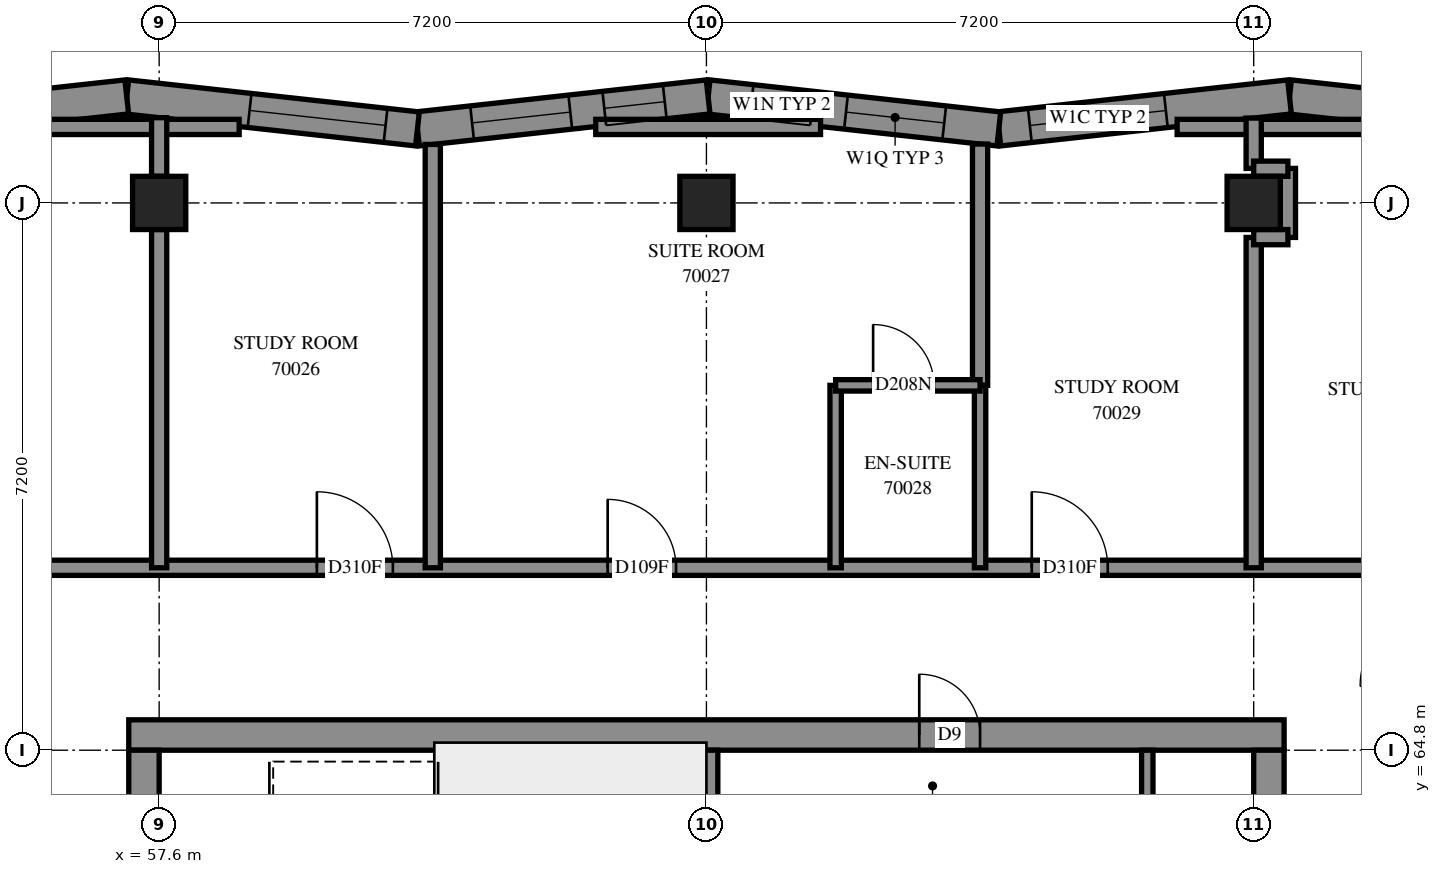
"""IFC4 building model, lengths in metres.
Left out: names, types, materials, properties, quantities, classifications, styles, units other than length and angle.
Written with IfcOpenShell. Run it as: python <this file> out.ifc"""

import sys

from ifc_helpers import new_model, si_unit, direction, frame, frame_2d, origin, origin_2d, place, context, subcontext, project, spatial, polyline, rectangle, outline, extrude, element, fill, save


model = new_model("IFC4")
c1 = context("Model", 3, precision=1e-05, world=origin(), true_north=direction((0.0, 1.0)))
c2 = subcontext(c1, "Body", "Model", "MODEL_VIEW")
j1 = project(units=[si_unit("LENGTHUNIT", "METRE"), si_unit("PLANEANGLEUNIT", "RADIAN")], contexts=[c1])
p1 = place(None, origin())
s1 = spatial("IfcSite", under=j1, at=p1, CompositionType="ELEMENT")
p2 = place(p1, origin())
s2 = spatial("IfcBuilding", under=s1, at=p2, CompositionType="ELEMENT")
p3 = place(p2, frame((0.0, 0.0, 257.4)))
s3 = spatial("IfcBuildingStorey", under=s2, at=p3, CompositionType="ELEMENT", Elevation=257.4)
for number, where, z_axis, x_axis in (
    (1, (57.6, 72.0, 0.0), (0.0, 0.0, 1.0), (1.0, 0.0, 0.0)),
    (2, (64.8, 72.0, 0.0), (0.0, 0.0, 1.0), (1.0, 0.0, 0.0)),
    (3, (72.0, 72.0, 0.0), (0.0, 0.0, 1.0), (1.0, 0.0, 0.0)),
):
    element("IfcColumn", number, at=place(p3, frame(where, z_axis=z_axis, x_axis=x_axis)), inside=s3, PredefinedType="COLUMN", context=c2, shape_type="SweptSolid", body=[
        extrude(rectangle(XDim=0.7, YDim=0.7, at=origin_2d()), origin(), (0.0, 0.0, 1.0), 3.1),
    ])
p4 = place(p3, frame((57.2, 65.0, -0.3), z_axis=(0.0, 0.0, 1.0), x_axis=(1.0, 0.0, 0.0)))
e4 = element("IfcWall", 4, at=p4, inside=s3, PredefinedType="SHEAR", context=c2, shape_type="SweptSolid", body=[
    extrude(rectangle(XDim=15.2, YDim=0.4, at=frame_2d((7.6, 0.0))), origin(), (0.0, 0.0, 1.0), 2.7),
])
p5 = place(p4, frame((10.4, 0.0, 0.3)))
e5 = element("IfcOpeningElement", 5, at=p5, cuts=e4, PredefinedType="OPENING", context=c2, shape_type="SweptSolid", body=[
    extrude(rectangle(XDim=0.8, YDim=2.1, at=frame_2d((0.4, 1.05))), frame((0.0, 0.21, 0.0), z_axis=(0.0, -1.0, 0.0), x_axis=(1.0, 0.0, 0.0)), (0.0, 0.0, 1.0), 0.42),
])
p6 = place(p3, frame((57.4, 50.4, -0.3), z_axis=(0.0, 0.0, 1.0), x_axis=(0.0, 1.0, 0.0)))
e6 = element("IfcWall", 6, at=p6, inside=s3, PredefinedType="SHEAR", context=c2, shape_type="SweptSolid", body=[
    extrude(rectangle(XDim=14.4, YDim=0.4, at=frame_2d((7.2, 0.0))), origin(), (0.0, 0.0, 1.0), 2.7),
])
p7 = place(p6, frame((4.55, 0.0, 0.3)))
e7 = element("IfcOpeningElement", 7, at=p7, cuts=e6, PredefinedType="OPENING", context=c2, shape_type="SweptSolid", body=[
    extrude(rectangle(XDim=1.1, YDim=2.1, at=frame_2d((0.55, 1.05))), frame((0.0, 0.21, 0.0), z_axis=(0.0, -1.0, 0.0), x_axis=(1.0, 0.0, 0.0)), (0.0, 0.0, 1.0), 0.42),
])
p8 = place(p6, frame((11.35, 0.0, 0.3)))
e8 = element("IfcOpeningElement", 8, at=p8, cuts=e6, PredefinedType="OPENING", context=c2, shape_type="SweptSolid", body=[
    extrude(rectangle(XDim=1.1, YDim=2.1, at=frame_2d((0.55, 1.05))), frame((0.0, 0.21, 0.0), z_axis=(0.0, -1.0, 0.0), x_axis=(1.0, 0.0, 0.0)), (0.0, 0.0, 1.0), 0.42),
])
p9 = place(p3, frame((72.2, 50.4, -0.3), z_axis=(0.0, 0.0, 1.0), x_axis=(0.0, 1.0, 0.0)))
e9 = element("IfcWall", 9, at=p9, inside=s3, PredefinedType="SHEAR", context=c2, shape_type="SweptSolid", body=[
    extrude(rectangle(XDim=14.4, YDim=0.4, at=frame_2d((7.2, 0.0))), origin(), (0.0, 0.0, 1.0), 2.7),
])
p10 = place(p9, frame((4.55, 0.0, 0.3)))
e10 = element("IfcOpeningElement", 10, at=p10, cuts=e9, PredefinedType="OPENING", context=c2, shape_type="SweptSolid", body=[
    extrude(rectangle(XDim=1.1, YDim=2.1, at=frame_2d((0.55, 1.05))), frame((0.0, 0.21, 0.0), z_axis=(0.0, -1.0, 0.0), x_axis=(1.0, 0.0, 0.0)), (0.0, 0.0, 1.0), 0.42),
])
p11 = place(p9, frame((11.35, 0.0, 0.3)))
e11 = element("IfcOpeningElement", 11, at=p11, cuts=e9, PredefinedType="OPENING", context=c2, shape_type="SweptSolid", body=[
    extrude(rectangle(XDim=1.1, YDim=2.1, at=frame_2d((0.55, 1.05))), frame((0.0, 0.21, 0.0), z_axis=(0.0, -1.0, 0.0), x_axis=(1.0, 0.0, 0.0)), (0.0, 0.0, 1.0), 0.42),
])
p12 = place(p3, frame((64.8, 60.6, 0.0), z_axis=(0.0, 0.0, 1.0), x_axis=(0.0, 1.0, 0.0)))
e12 = element("IfcWall", 12, at=p12, inside=s3, PredefinedType="SOLIDWALL", context=c2, shape_type="SweptSolid", body=[
    extrude(rectangle(XDim=4.2, YDim=0.3, at=frame_2d((2.1, 0.0))), origin(), (0.0, 0.0, 1.0), 3.1),
])
p13 = place(p3, frame((76.313, 72.972, 0.0), z_axis=(0.0, 0.0, 1.0), x_axis=(-0.9939952411, 0.1094233099, 0.0)))
e13 = element("IfcWall", 13, at=p13, inside=s3, PredefinedType="SOLIDWALL", context=c2, shape_type="SweptSolid", body=[
    extrude(outline(polyline([(0.042, -0.225), (3.89, -0.225), (3.84, 0.225), (-0.042, 0.225), (0.042, -0.225)])), origin(), (0.0, 0.0, 1.0), 3.1),
])
p14 = place(p13, frame((1.029, 0.0, 0.45)))
e14 = element("IfcOpeningElement", 14, at=p14, cuts=e13, PredefinedType="OPENING", context=c2, shape_type="SweptSolid", body=[
    extrude(rectangle(XDim=1.2, YDim=2.55, at=frame_2d((0.6, 1.275))), frame((0.0, 0.235, 0.0), z_axis=(0.0, -1.0, 0.0), x_axis=(1.0, 0.0, 0.0)), (0.0, 0.0, 1.0), 0.47),
])
p15 = place(p3, frame((72.471, 73.395, 0.0), z_axis=(0.0, 0.0, 1.0), x_axis=(-0.9939954262, -0.1094216281, 0.0)))
e15 = element("IfcWall", 15, at=p15, inside=s3, PredefinedType="SOLIDWALL", context=c2, shape_type="SweptSolid", body=[
    extrude(outline(polyline([(-0.025, -0.225), (3.823, -0.225), (3.872, 0.225), (0.025, 0.225), (-0.025, -0.225)])), origin(), (0.0, 0.0, 1.0), 3.1),
])
p16 = place(p15, frame((1.637, 0.0, 0.7)))
e16 = element("IfcOpeningElement", 16, at=p16, cuts=e15, PredefinedType="OPENING", context=c2, shape_type="SweptSolid", body=[
    extrude(rectangle(XDim=1.8, YDim=2.3, at=frame_2d((0.9, 1.15))), frame((0.0, 0.235, 0.0), z_axis=(0.0, -1.0, 0.0), x_axis=(1.0, 0.0, 0.0)), (0.0, 0.0, 1.0), 0.47),
])
p17 = place(p3, frame((68.647, 72.974, 0.0), z_axis=(0.0, 0.0, 1.0), x_axis=(-0.993995115, 0.109424455, 0.0)))
e17 = element("IfcWall", 17, at=p17, inside=s3, PredefinedType="SOLIDWALL", context=c2, shape_type="SweptSolid", body=[
    extrude(outline(polyline([(0.025, -0.225), (3.872, -0.225), (3.823, 0.225), (-0.025, 0.225), (0.025, -0.225)])), origin(), (0.0, 0.0, 1.0), 3.1),
])
p18 = place(p17, frame((0.723, 0.0, 0.45)))
e18 = element("IfcOpeningElement", 18, at=p18, cuts=e17, PredefinedType="OPENING", context=c2, shape_type="SweptSolid", body=[
    extrude(rectangle(XDim=1.3, YDim=2.5, at=frame_2d((0.65, 1.25))), frame((0.0, 0.235, 0.0), z_axis=(0.0, -1.0, 0.0), x_axis=(1.0, 0.0, 0.0)), (0.0, 0.0, 1.0), 0.47),
])
p19 = place(p17, frame((2.473, 0.0, 0.45)))
e19 = element("IfcOpeningElement", 19, at=p19, cuts=e17, PredefinedType="OPENING", context=c2, shape_type="SweptSolid", body=[
    extrude(rectangle(XDim=0.8, YDim=2.5, at=frame_2d((0.4, 1.25))), frame((0.0, 0.235, 0.0), z_axis=(0.0, -1.0, 0.0), x_axis=(1.0, 0.0, 0.0)), (0.0, 0.0, 1.0), 0.47),
])
p20 = place(p3, frame((64.823, 73.395, 0.0), z_axis=(0.0, 0.0, 1.0), x_axis=(-0.9939954262, -0.1094216281, 0.0)))
e20 = element("IfcWall", 20, at=p20, inside=s3, PredefinedType="SOLIDWALL", context=c2, shape_type="SweptSolid", body=[
    extrude(outline(polyline([(-0.025, -0.225), (3.823, -0.225), (3.872, 0.225), (0.025, 0.225), (-0.025, -0.225)])), origin(), (0.0, 0.0, 1.0), 3.1),
])
p21 = place(p20, frame((0.575, 0.0, 0.45)))
e21 = element("IfcOpeningElement", 21, at=p21, cuts=e20, PredefinedType="OPENING", context=c2, shape_type="SweptSolid", body=[
    extrude(rectangle(XDim=0.8, YDim=2.5, at=frame_2d((0.4, 1.25))), frame((0.0, 0.235, 0.0), z_axis=(0.0, -1.0, 0.0), x_axis=(1.0, 0.0, 0.0)), (0.0, 0.0, 1.0), 0.47),
])
p22 = place(p20, frame((1.825, 0.0, 0.45)))
e22 = element("IfcOpeningElement", 22, at=p22, cuts=e20, PredefinedType="OPENING", context=c2, shape_type="SweptSolid", body=[
    extrude(rectangle(XDim=1.3, YDim=2.5, at=frame_2d((0.65, 1.25))), frame((0.0, 0.235, 0.0), z_axis=(0.0, -1.0, 0.0), x_axis=(1.0, 0.0, 0.0)), (0.0, 0.0, 1.0), 0.47),
])
p23 = place(p3, frame((60.998, 72.974, 0.0), z_axis=(0.0, 0.0, 1.0), x_axis=(-0.993995115, 0.109424455, 0.0)))
e23 = element("IfcWall", 23, at=p23, inside=s3, PredefinedType="SOLIDWALL", context=c2, shape_type="SweptSolid", body=[
    extrude(outline(polyline([(0.025, -0.225), (3.872, -0.225), (3.823, 0.225), (-0.025, 0.225), (0.025, -0.225)])), origin(), (0.0, 0.0, 1.0), 3.1),
])
p24 = place(p23, frame((0.422, 0.0, 0.7)))
e24 = element("IfcOpeningElement", 24, at=p24, cuts=e23, PredefinedType="OPENING", context=c2, shape_type="SweptSolid", body=[
    extrude(rectangle(XDim=1.8, YDim=2.3, at=frame_2d((0.9, 1.15))), frame((0.0, 0.235, 0.0), z_axis=(0.0, -1.0, 0.0), x_axis=(1.0, 0.0, 0.0)), (0.0, 0.0, 1.0), 0.47),
])
p25 = place(p3, frame((57.174, 73.395, 0.0), z_axis=(0.0, 0.0, 1.0), x_axis=(-0.9939954262, -0.1094216281, 0.0)))
e25 = element("IfcWall", 25, at=p25, inside=s3, PredefinedType="SOLIDWALL", context=c2, shape_type="SweptSolid", body=[
    extrude(outline(polyline([(-0.025, -0.225), (3.823, -0.225), (3.872, 0.225), (0.025, 0.225), (-0.025, -0.225)])), origin(), (0.0, 0.0, 1.0), 3.1),
])
p26 = place(p25, frame((1.659, 0.0, 0.45)))
e26 = element("IfcOpeningElement", 26, at=p26, cuts=e25, PredefinedType="OPENING", context=c2, shape_type="SweptSolid", body=[
    extrude(rectangle(XDim=1.2, YDim=2.55, at=frame_2d((0.6, 1.275))), frame((0.0, 0.235, 0.0), z_axis=(0.0, -1.0, 0.0), x_axis=(1.0, 0.0, 0.0)), (0.0, 0.0, 1.0), 0.47),
])
p27 = place(p3, frame((70.6, 63.78, 0.0), z_axis=(0.0, 0.0, 1.0), x_axis=(0.0, 1.0, 0.0)))
e27 = element("IfcWall", 27, at=p27, inside=s3, PredefinedType="PARTITIONING", context=c2, shape_type="SweptSolid", body=[
    extrude(rectangle(XDim=1.02, YDim=0.15, at=frame_2d((0.51, 0.0))), origin(), (0.0, 0.0, 1.0), 3.1),
])
p28 = place(p3, frame((55.2, 67.2, 0.0), z_axis=(0.0, 0.0, 1.0), x_axis=(1.0, 0.0, 0.0)))
e28 = element("IfcWall", 28, at=p28, inside=s3, PredefinedType="PARTITIONING", context=c2, shape_type="SweptSolid", body=[
    extrude(rectangle(XDim=19.2, YDim=0.2, at=frame_2d((9.6, 0.0))), origin(), (0.0, 0.0, 1.0), 3.1),
])
p29 = place(p28, frame((4.475, 0.0, 0.0)))
e29 = element("IfcOpeningElement", 29, at=p29, cuts=e28, PredefinedType="OPENING", context=c2, shape_type="SweptSolid", body=[
    extrude(rectangle(XDim=1.0, YDim=2.1, at=frame_2d((0.5, 1.05))), frame((0.0, 0.11, 0.0), z_axis=(0.0, -1.0, 0.0), x_axis=(1.0, 0.0, 0.0)), (0.0, 0.0, 1.0), 0.22),
])
p30 = place(p28, frame((8.301, 0.0, 0.0)))
e30 = element("IfcOpeningElement", 30, at=p30, cuts=e28, PredefinedType="OPENING", context=c2, shape_type="SweptSolid", body=[
    extrude(rectangle(XDim=0.9, YDim=2.1, at=frame_2d((0.45, 1.05))), frame((0.0, 0.11, 0.0), z_axis=(0.0, -1.0, 0.0), x_axis=(1.0, 0.0, 0.0)), (0.0, 0.0, 1.0), 0.22),
])
p31 = place(p28, frame((13.88, 0.0, 0.0)))
e31 = element("IfcOpeningElement", 31, at=p31, cuts=e28, PredefinedType="OPENING", context=c2, shape_type="SweptSolid", body=[
    extrude(rectangle(XDim=1.0, YDim=2.1, at=frame_2d((0.5, 1.05))), frame((0.0, 0.11, 0.0), z_axis=(0.0, -1.0, 0.0), x_axis=(1.0, 0.0, 0.0)), (0.0, 0.0, 1.0), 0.22),
])
p32 = place(p3, frame((61.2, 67.2, 0.0), z_axis=(0.0, 0.0, 1.0), x_axis=(0.0, 1.0, 0.0)))
e32 = element("IfcWall", 32, at=p32, inside=s3, PredefinedType="PARTITIONING", context=c2, shape_type="SweptSolid", body=[
    extrude(rectangle(XDim=5.569, YDim=0.2, at=frame_2d((2.785, 0.0))), origin(), (0.0, 0.0, 1.0), 3.1),
])
p33 = place(p3, frame((57.6, 67.2, 0.0), z_axis=(0.0, 0.0, 1.0), x_axis=(0.0, 1.0, 0.0)))
e33 = element("IfcWall", 33, at=p33, inside=s3, PredefinedType="PARTITIONING", context=c2, shape_type="SweptSolid", body=[
    extrude(rectangle(XDim=4.45, YDim=0.2, at=frame_2d((2.225, 0.0))), origin(), (0.0, 0.0, 1.0), 3.1),
])
p34 = place(p3, frame((72.0, 67.2, 0.0), z_axis=(0.0, 0.0, 1.0), x_axis=(0.0, 1.0, 0.0)))
e34 = element("IfcWall", 34, at=p34, inside=s3, PredefinedType="PARTITIONING", context=c2, shape_type="SweptSolid", body=[
    extrude(rectangle(XDim=4.346, YDim=0.2, at=frame_2d((2.173, 0.0))), origin(), (0.0, 0.0, 1.0), 3.1),
])
p35 = place(p3, frame((68.4, 69.6, 0.0), z_axis=(0.0, 0.0, 1.0), x_axis=(0.0, 1.0, 0.0)))
e35 = element("IfcWall", 35, at=p35, inside=s3, PredefinedType="PARTITIONING", context=c2, shape_type="SweptSolid", body=[
    extrude(rectangle(XDim=3.175, YDim=0.2, at=frame_2d((1.587, 0.0))), origin(), (0.0, 0.0, 1.0), 3.1),
])
p36 = place(p3, frame((70.993, 73.0, 0.0), z_axis=(0.0, 0.0, 1.0), x_axis=(1.0, 0.0, 0.0)))
e36 = element("IfcWall", 36, at=p36, inside=s3, PredefinedType="PARTITIONING", context=c2, shape_type="SweptSolid", body=[
    extrude(rectangle(XDim=2.957, YDim=0.2, at=frame_2d((1.479, 0.0))), origin(), (0.0, 0.0, 1.0), 3.1),
])
for number, where, z_axis, x_axis in (
    (37, (63.344, 73.0, 0.0), (0.0, 0.0, 1.0), (1.0, 0.0, 0.0)),
    (38, (55.695, 73.0, 0.0), (0.0, 0.0, 1.0), (1.0, 0.0, 0.0)),
):
    element("IfcWall", number, at=place(p3, frame(where, z_axis=z_axis, x_axis=x_axis)), inside=s3, PredefinedType="PARTITIONING", context=c2, shape_type="SweptSolid", body=[
        extrude(rectangle(XDim=2.957, YDim=0.2, at=frame_2d((1.479, 0.0))), origin(), (0.0, 0.0, 1.0), 3.1),
    ])
for number, where, z_axis, x_axis in (
    (39, (66.5, 67.2, 0.0), (0.0, 0.0, 1.0), (0.0, 1.0, 0.0)),
    (40, (68.4, 67.2, 0.0), (0.0, 0.0, 1.0), (0.0, 1.0, 0.0)),
):
    element("IfcWall", number, at=place(p3, frame(where, z_axis=z_axis, x_axis=x_axis)), inside=s3, PredefinedType="PARTITIONING", context=c2, shape_type="SweptSolid", body=[
        extrude(rectangle(XDim=2.4, YDim=0.15, at=frame_2d((1.2, 0.0))), origin(), (0.0, 0.0, 1.0), 3.1),
    ])
p37 = place(p3, frame((66.5, 69.6, 0.0), z_axis=(0.0, 0.0, 1.0), x_axis=(1.0, 0.0, 0.0)))
e41 = element("IfcWall", 41, at=p37, inside=s3, PredefinedType="PARTITIONING", context=c2, shape_type="SweptSolid", body=[
    extrude(rectangle(XDim=1.9, YDim=0.15, at=frame_2d((0.95, 0.0))), origin(), (0.0, 0.0, 1.0), 3.1),
])
p38 = place(p37, frame((0.493, 0.0, 0.0)))
e42 = element("IfcOpeningElement", 42, at=p38, cuts=e41, PredefinedType="OPENING", context=c2, shape_type="SweptSolid", body=[
    extrude(rectangle(XDim=0.8, YDim=2.1, at=frame_2d((0.4, 1.05))), frame((0.0, 0.085, 0.0), z_axis=(0.0, -1.0, 0.0), x_axis=(1.0, 0.0, 0.0)), (0.0, 0.0, 1.0), 0.17),
])
p39 = place(p3, frame((72.45, 71.546, 0.0), z_axis=(0.0, 0.0, 1.0), x_axis=(0.0, 1.0, 0.0)))
e43 = element("IfcWall", 43, at=p39, inside=s3, PredefinedType="PARTITIONING", context=c2, shape_type="SweptSolid", body=[
    extrude(rectangle(XDim=0.908, YDim=0.2, at=frame_2d((0.454, 0.0))), origin(), (0.0, 0.0, 1.0), 3.1),
])
p40 = place(p3, frame((57.6, 72.35, 0.0), z_axis=(0.0, 0.0, 1.0), x_axis=(0.0, 1.0, 0.0)))
e44 = element("IfcWall", 44, at=p40, inside=s3, PredefinedType="PARTITIONING", context=c2, shape_type="SweptSolid", body=[
    extrude(rectangle(XDim=0.771, YDim=0.2, at=frame_2d((0.386, 0.0))), origin(), (0.0, 0.0, 1.0), 3.1),
])
p41 = place(p3, frame((72.0, 72.454, 0.0), z_axis=(0.0, 0.0, 1.0), x_axis=(0.0, 1.0, 0.0)))
e45 = element("IfcWall", 45, at=p41, inside=s3, PredefinedType="PARTITIONING", context=c2, shape_type="SweptSolid", body=[
    extrude(rectangle(XDim=0.662, YDim=0.2, at=frame_2d((0.331, 0.0))), origin(), (0.0, 0.0, 1.0), 3.1),
])
for number, where, z_axis, x_axis in (
    (46, (72.0, 72.45, 0.0), (0.0, 0.0, 1.0), (1.0, 0.0, 0.0)),
    (47, (72.0, 71.55, 0.0), (0.0, 0.0, 1.0), (1.0, 0.0, 0.0)),
):
    element("IfcWall", number, at=place(p3, frame(where, z_axis=z_axis, x_axis=x_axis)), inside=s3, PredefinedType="PARTITIONING", context=c2, shape_type="SweptSolid", body=[
        extrude(rectangle(XDim=0.45, YDim=0.2, at=frame_2d((0.225, 0.0))), origin(), (0.0, 0.0, 1.0), 3.1),
    ])
p42 = place(p5, origin())
e48 = element("IfcDoor", 48, at=p42, inside=s3, OperationType="SINGLE_SWING_RIGHT", PredefinedType="DOOR", context=c2, shape_type="SweptSolid", body=[
    extrude(rectangle(XDim=0.8, YDim=2.1, at=frame_2d((0.4, 1.05))), frame((0.0, 0.025, 0.0), z_axis=(0.0, -1.0, 0.0), x_axis=(1.0, 0.0, 0.0)), (0.0, 0.0, 1.0), 0.05),
])
fill(e5, e48)
p43 = place(p29, origin())
e49 = element("IfcDoor", 49, at=p43, inside=s3, OperationType="SINGLE_SWING_RIGHT", PredefinedType="DOOR", context=c2, shape_type="SweptSolid", body=[
    extrude(rectangle(XDim=1.0, YDim=2.1, at=frame_2d((0.5, 1.05))), frame((0.0, 0.025, 0.0), z_axis=(0.0, -1.0, 0.0), x_axis=(1.0, 0.0, 0.0)), (0.0, 0.0, 1.0), 0.05),
])
fill(e29, e49)
p44 = place(p30, origin())
e50 = element("IfcDoor", 50, at=p44, inside=s3, OperationType="SINGLE_SWING_LEFT", PredefinedType="DOOR", context=c2, shape_type="SweptSolid", body=[
    extrude(rectangle(XDim=0.9, YDim=2.1, at=frame_2d((0.45, 1.05))), frame((0.0, 0.025, 0.0), z_axis=(0.0, -1.0, 0.0), x_axis=(1.0, 0.0, 0.0)), (0.0, 0.0, 1.0), 0.05),
])
fill(e30, e50)
p45 = place(p38, origin())
e51 = element("IfcDoor", 51, at=p45, inside=s3, OperationType="SINGLE_SWING_RIGHT", PredefinedType="DOOR", context=c2, shape_type="SweptSolid", body=[
    extrude(rectangle(XDim=0.8, YDim=2.1, at=frame_2d((0.4, 1.05))), frame((0.0, 0.025, 0.0), z_axis=(0.0, -1.0, 0.0), x_axis=(1.0, 0.0, 0.0)), (0.0, 0.0, 1.0), 0.05),
])
fill(e42, e51)
p46 = place(p31, origin())
e52 = element("IfcDoor", 52, at=p46, inside=s3, OperationType="SINGLE_SWING_LEFT", PredefinedType="DOOR", context=c2, shape_type="SweptSolid", body=[
    extrude(rectangle(XDim=1.0, YDim=2.1, at=frame_2d((0.5, 1.05))), frame((0.0, 0.025, 0.0), z_axis=(0.0, -1.0, 0.0), x_axis=(1.0, 0.0, 0.0)), (0.0, 0.0, 1.0), 0.05),
])
fill(e31, e52)
p47 = place(p16, origin())
e53 = element("IfcWindow", 53, at=p47, inside=s3, PartitioningType="SINGLE_PANEL", PredefinedType="WINDOW", context=c2, shape_type="SweptSolid", body=[
    extrude(rectangle(XDim=1.8, YDim=2.3, at=frame_2d((0.9, 1.15))), frame((0.0, 0.205, 0.0), z_axis=(0.0, -1.0, 0.0), x_axis=(1.0, 0.0, 0.0)), (0.0, 0.0, 1.0), 0.06),
])
fill(e16, e53)
p48 = place(p18, origin())
e54 = element("IfcWindow", 54, at=p48, inside=s3, PartitioningType="SINGLE_PANEL", PredefinedType="WINDOW", context=c2, shape_type="SweptSolid", body=[
    extrude(rectangle(XDim=1.3, YDim=2.5, at=frame_2d((0.65, 1.25))), frame((0.0, 0.205, 0.0), z_axis=(0.0, -1.0, 0.0), x_axis=(1.0, 0.0, 0.0)), (0.0, 0.0, 1.0), 0.06),
])
fill(e18, e54)
p49 = place(p19, origin())
e55 = element("IfcWindow", 55, at=p49, inside=s3, PartitioningType="SINGLE_PANEL", PredefinedType="WINDOW", context=c2, shape_type="SweptSolid", body=[
    extrude(rectangle(XDim=0.8, YDim=2.5, at=frame_2d((0.4, 1.25))), frame((0.0, 0.115, 0.0), z_axis=(0.0, -1.0, 0.0), x_axis=(1.0, 0.0, 0.0)), (0.0, 0.0, 1.0), 0.06),
])
fill(e19, e55)
p50 = place(p21, origin())
e56 = element("IfcWindow", 56, at=p50, inside=s3, PartitioningType="SINGLE_PANEL", PredefinedType="WINDOW", context=c2, shape_type="SweptSolid", body=[
    extrude(rectangle(XDim=0.8, YDim=2.5, at=frame_2d((0.4, 1.25))), frame((0.0, 0.115, 0.0), z_axis=(0.0, -1.0, 0.0), x_axis=(1.0, 0.0, 0.0)), (0.0, 0.0, 1.0), 0.06),
])
fill(e21, e56)
p51 = place(p22, origin())
e57 = element("IfcWindow", 57, at=p51, inside=s3, PartitioningType="SINGLE_PANEL", PredefinedType="WINDOW", context=c2, shape_type="SweptSolid", body=[
    extrude(rectangle(XDim=1.3, YDim=2.5, at=frame_2d((0.65, 1.25))), frame((0.0, 0.205, 0.0), z_axis=(0.0, -1.0, 0.0), x_axis=(1.0, 0.0, 0.0)), (0.0, 0.0, 1.0), 0.06),
])
fill(e22, e57)
p52 = place(p24, origin())
e58 = element("IfcWindow", 58, at=p52, inside=s3, PartitioningType="SINGLE_PANEL", PredefinedType="WINDOW", context=c2, shape_type="SweptSolid", body=[
    extrude(rectangle(XDim=1.8, YDim=2.3, at=frame_2d((0.9, 1.15))), frame((0.0, 0.205, 0.0), z_axis=(0.0, -1.0, 0.0), x_axis=(1.0, 0.0, 0.0)), (0.0, 0.0, 1.0), 0.06),
])
fill(e24, e58)
save(model, sys.argv[1])
